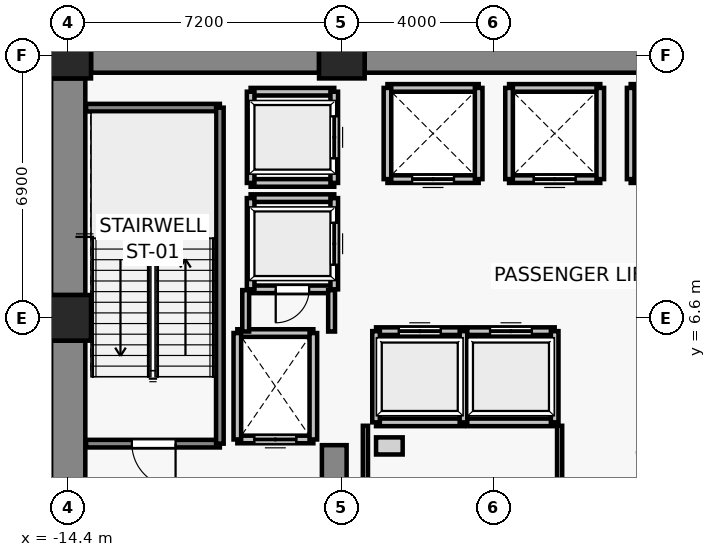
"""IFC4 building model, lengths in metres.
Left out: names, types, materials, properties, quantities, classifications, styles, units other than length and angle.
Written with IfcOpenShell. Run it as: python <this file> out.ifc"""

import sys

from ifc_helpers import new_model, si_unit, direction, frame, frame_2d, origin, origin_2d, place, context, subcontext, project, spatial, rectangle, extrude, source, transform, mapped, element, fill, save


model = new_model("IFC4")
c1 = context("Model", 3, precision=1e-05, world=origin(), true_north=direction((0.0, 1.0)))
c2 = subcontext(c1, "Body", "Model", "MODEL_VIEW")
j1 = project(units=[si_unit("LENGTHUNIT", "METRE"), si_unit("PLANEANGLEUNIT", "RADIAN")], contexts=[c1])
p1 = place(None, origin())
s1 = spatial("IfcSite", under=j1, at=p1, CompositionType="ELEMENT")
p2 = place(p1, origin())
s2 = spatial("IfcBuilding", under=s1, at=p2, CompositionType="ELEMENT")
p3 = place(p2, origin())
s3 = spatial("IfcBuildingStorey", under=s2, at=p3, CompositionType="ELEMENT", Elevation=0.0)
for number, where, z_axis, x_axis in (
    (1, (-14.4, 6.6, 0.0), (0.0, 0.0, 1.0), (1.0, 0.0, 0.0)),
    (2, (-14.4, 13.5, 0.0), (0.0, 0.0, 1.0), (1.0, 0.0, 0.0)),
    (3, (-7.2, 13.5, 0.0), (0.0, 0.0, 1.0), (1.0, 0.0, 0.0)),
):
    element("IfcColumn", number, at=place(p3, frame(where, z_axis=z_axis, x_axis=x_axis)), inside=s3, PredefinedType="COLUMN", context=c2, shape_type="SweptSolid", body=[
        extrude(rectangle(XDim=1.2, YDim=1.2, at=origin_2d()), origin(), (0.0, 0.0, 1.0), 5.0),
    ])
p4 = place(p3, frame((-13.8, 13.5, 0.0), z_axis=(0.0, 0.0, 1.0), x_axis=(1.0, 0.0, 0.0)))
e4 = element("IfcWall", 4, at=p4, inside=s3, PredefinedType="SHEAR", context=c2, shape_type="SweptSolid", body=[
    extrude(rectangle(XDim=6.0, YDim=0.9, at=frame_2d((3.0, 0.0))), origin(), (0.0, 0.0, 1.0), 4.7),
])
p5 = place(p3, frame((-6.6, 13.5, 0.0), z_axis=(0.0, 0.0, 1.0), x_axis=(1.0, 0.0, 0.0)))
e5 = element("IfcWall", 5, at=p5, inside=s3, PredefinedType="SHEAR", context=c2, shape_type="SweptSolid", body=[
    extrude(rectangle(XDim=13.2, YDim=0.9, at=frame_2d((6.6, 0.0))), origin(), (0.0, 0.0, 1.0), 4.7),
])
p6 = place(p3, frame((-14.4, -0.6, 0.0), z_axis=(0.0, 0.0, 1.0), x_axis=(0.0, 1.0, 0.0)))
e6 = element("IfcWall", 6, at=p6, inside=s3, PredefinedType="SHEAR", context=c2, shape_type="SweptSolid", body=[
    extrude(rectangle(XDim=6.6, YDim=0.9, at=frame_2d((3.3, 0.0))), origin(), (0.0, 0.0, 1.0), 4.7),
])
p7 = place(p3, frame((-14.4, 7.2, 0.0), z_axis=(0.0, 0.0, 1.0), x_axis=(0.0, 1.0, 0.0)))
e7 = element("IfcWall", 7, at=p7, inside=s3, PredefinedType="SHEAR", context=c2, shape_type="SweptSolid", body=[
    extrude(rectangle(XDim=5.7, YDim=0.9, at=frame_2d((2.85, 0.0))), origin(), (0.0, 0.0, 1.0), 4.7),
])
p8 = place(p3, frame((-7.4, -0.75, 0.0), z_axis=(0.0, 0.0, 1.0), x_axis=(0.0, 1.0, 0.0)))
e8 = element("IfcWall", 8, at=p8, inside=s3, PredefinedType="SHEAR", context=c2, shape_type="SweptSolid", body=[
    extrude(rectangle(XDim=4.0, YDim=0.65, at=frame_2d((2.0, 0.0))), origin(), (0.0, 0.0, 1.0), 4.7),
])
p9 = place(p3, frame((-7.95, 3.4, 0.0), z_axis=(0.0, 0.0, 1.0), x_axis=(-1.0, 0.0, 0.0)))
e9 = element("IfcWall", 9, at=p9, inside=s3, PredefinedType="SOLIDWALL", context=c2, shape_type="SweptSolid", body=[
    extrude(rectangle(XDim=2.0, YDim=0.2, at=frame_2d((1.0, 0.0))), origin(), (0.0, 0.0, 1.0), 4.7),
])
p10 = place(p9, frame((0.45, 0.0, 0.0)))
e10 = element("IfcOpeningElement", 10, at=p10, cuts=e9, PredefinedType="OPENING", context=c2, shape_type="SweptSolid", body=[
    extrude(rectangle(XDim=1.1, YDim=2.2, at=frame_2d((0.55, 1.1))), frame((0.0, 0.11, 0.0), z_axis=(0.0, -1.0, 0.0), x_axis=(1.0, 0.0, 0.0)), (0.0, 0.0, 1.0), 0.22),
])
p11 = place(p3, frame((-9.95, 6.2, 0.0), z_axis=(0.0, 0.0, 1.0), x_axis=(1.0, 0.0, 0.0)))
e11 = element("IfcWall", 11, at=p11, inside=s3, PredefinedType="SOLIDWALL", context=c2, shape_type="SweptSolid", body=[
    extrude(rectangle(XDim=2.0, YDim=0.2, at=frame_2d((1.0, 0.0))), origin(), (0.0, 0.0, 1.0), 4.7),
])
for number, where, z_axis, x_axis in (
    (12, (-9.95, 3.4, 0.0), (0.0, 0.0, 1.0), (0.0, 1.0, 0.0)),
    (13, (-7.95, 6.2, 0.0), (0.0, 0.0, 1.0), (0.0, -1.0, 0.0)),
):
    element("IfcWall", number, at=place(p3, frame(where, z_axis=z_axis, x_axis=x_axis)), inside=s3, PredefinedType="SOLIDWALL", context=c2, shape_type="SweptSolid", body=[
        extrude(rectangle(XDim=2.8, YDim=0.2, at=frame_2d((1.4, 0.0))), origin(), (0.0, 0.0, 1.0), 4.7),
    ])
p12 = place(p3, frame((-3.6, 10.25, 0.0), z_axis=(0.0, 0.0, 1.0), x_axis=(-1.0, 0.0, 0.0)))
e14 = element("IfcWall", 14, at=p12, inside=s3, PredefinedType="SOLIDWALL", context=c2, shape_type="SweptSolid", body=[
    extrude(rectangle(XDim=2.4, YDim=0.2, at=frame_2d((1.2, 0.0))), origin(), (0.0, 0.0, 1.0), 4.7),
])
p13 = place(p12, frame((0.65, 0.0, 0.0)))
e15 = element("IfcOpeningElement", 15, at=p13, cuts=e14, PredefinedType="OPENING", context=c2, shape_type="SweptSolid", body=[
    extrude(rectangle(XDim=1.1, YDim=2.2, at=frame_2d((0.55, 1.1))), frame((0.0, 0.11, 0.0), z_axis=(0.0, -1.0, 0.0), x_axis=(1.0, 0.0, 0.0)), (0.0, 0.0, 1.0), 0.22),
])
for number, where, z_axis, x_axis in (
    (16, (-6.0, 12.65, 0.0), (0.0, 0.0, 1.0), (1.0, 0.0, 0.0)),
    (17, (-6.0, 10.25, 0.0), (0.0, 0.0, 1.0), (0.0, 1.0, 0.0)),
    (18, (-3.6, 12.65, 0.0), (0.0, 0.0, 1.0), (0.0, -1.0, 0.0)),
):
    element("IfcWall", number, at=place(p3, frame(where, z_axis=z_axis, x_axis=x_axis)), inside=s3, PredefinedType="SOLIDWALL", context=c2, shape_type="SweptSolid", body=[
        extrude(rectangle(XDim=2.4, YDim=0.2, at=frame_2d((1.2, 0.0))), origin(), (0.0, 0.0, 1.0), 4.7),
    ])
p14 = place(p3, frame((-0.4, 10.25, 0.0), z_axis=(0.0, 0.0, 1.0), x_axis=(-1.0, 0.0, 0.0)))
e19 = element("IfcWall", 19, at=p14, inside=s3, PredefinedType="SOLIDWALL", context=c2, shape_type="SweptSolid", body=[
    extrude(rectangle(XDim=2.4, YDim=0.2, at=frame_2d((1.2, 0.0))), origin(), (0.0, 0.0, 1.0), 4.7),
])
p15 = place(p14, frame((0.65, 0.0, 0.0)))
e20 = element("IfcOpeningElement", 20, at=p15, cuts=e19, PredefinedType="OPENING", context=c2, shape_type="SweptSolid", body=[
    extrude(rectangle(XDim=1.1, YDim=2.2, at=frame_2d((0.55, 1.1))), frame((0.0, 0.11, 0.0), z_axis=(0.0, -1.0, 0.0), x_axis=(1.0, 0.0, 0.0)), (0.0, 0.0, 1.0), 0.22),
])
p16 = place(p3, frame((-2.8, 12.65, 0.0), z_axis=(0.0, 0.0, 1.0), x_axis=(1.0, 0.0, 0.0)))
e21 = element("IfcWall", 21, at=p16, inside=s3, PredefinedType="SOLIDWALL", context=c2, shape_type="SweptSolid", body=[
    extrude(rectangle(XDim=2.4, YDim=0.2, at=frame_2d((1.2, 0.0))), origin(), (0.0, 0.0, 1.0), 4.7),
])
for number, where, z_axis, x_axis in (
    (22, (-2.8, 10.25, 0.0), (0.0, 0.0, 1.0), (0.0, 1.0, 0.0)),
    (23, (-0.4, 12.65, 0.0), (0.0, 0.0, 1.0), (0.0, -1.0, 0.0)),
):
    element("IfcWall", number, at=place(p3, frame(where, z_axis=z_axis, x_axis=x_axis)), inside=s3, PredefinedType="SOLIDWALL", context=c2, shape_type="SweptSolid", body=[
        extrude(rectangle(XDim=2.4, YDim=0.2, at=frame_2d((1.2, 0.0))), origin(), (0.0, 0.0, 1.0), 4.7),
    ])
p17 = place(p3, frame((2.8, 10.25, 0.0), z_axis=(0.0, 0.0, 1.0), x_axis=(-1.0, 0.0, 0.0)))
e24 = element("IfcWall", 24, at=p17, inside=s3, PredefinedType="SOLIDWALL", context=c2, shape_type="SweptSolid", body=[
    extrude(rectangle(XDim=2.4, YDim=0.2, at=frame_2d((1.2, 0.0))), origin(), (0.0, 0.0, 1.0), 4.7),
])
p18 = place(p17, frame((0.65, 0.0, 0.0)))
e25 = element("IfcOpeningElement", 25, at=p18, cuts=e24, PredefinedType="OPENING", context=c2, shape_type="SweptSolid", body=[
    extrude(rectangle(XDim=1.1, YDim=2.2, at=frame_2d((0.55, 1.1))), frame((0.0, 0.11, 0.0), z_axis=(0.0, -1.0, 0.0), x_axis=(1.0, 0.0, 0.0)), (0.0, 0.0, 1.0), 0.22),
])
p19 = place(p3, frame((0.4, 12.65, 0.0), z_axis=(0.0, 0.0, 1.0), x_axis=(1.0, 0.0, 0.0)))
e26 = element("IfcWall", 26, at=p19, inside=s3, PredefinedType="SOLIDWALL", context=c2, shape_type="SweptSolid", body=[
    extrude(rectangle(XDim=2.4, YDim=0.2, at=frame_2d((1.2, 0.0))), origin(), (0.0, 0.0, 1.0), 4.7),
])
p20 = place(p3, frame((0.4, 10.25, 0.0), z_axis=(0.0, 0.0, 1.0), x_axis=(0.0, 1.0, 0.0)))
e27 = element("IfcWall", 27, at=p20, inside=s3, PredefinedType="SOLIDWALL", context=c2, shape_type="SweptSolid", body=[
    extrude(rectangle(XDim=2.4, YDim=0.2, at=frame_2d((1.2, 0.0))), origin(), (0.0, 0.0, 1.0), 4.7),
])
p21 = place(p3, frame((-4.0, 3.85, 0.0), z_axis=(0.0, 0.0, 1.0), x_axis=(-1.0, 0.0, 0.0)))
e28 = element("IfcWall", 28, at=p21, inside=s3, PredefinedType="SOLIDWALL", context=c2, shape_type="SweptSolid", body=[
    extrude(rectangle(XDim=2.3, YDim=0.2, at=frame_2d((1.15, 0.0))), origin(), (0.0, 0.0, 1.0), 4.7),
])
p22 = place(p3, frame((-6.3, 6.25, 0.0), z_axis=(0.0, 0.0, 1.0), x_axis=(1.0, 0.0, 0.0)))
e29 = element("IfcWall", 29, at=p22, inside=s3, PredefinedType="SOLIDWALL", context=c2, shape_type="SweptSolid", body=[
    extrude(rectangle(XDim=2.3, YDim=0.2, at=frame_2d((1.15, 0.0))), origin(), (0.0, 0.0, 1.0), 4.7),
])
p23 = place(p22, frame((0.6, 0.0, 0.0)))
e30 = element("IfcOpeningElement", 30, at=p23, cuts=e29, PredefinedType="OPENING", context=c2, shape_type="SweptSolid", body=[
    extrude(rectangle(XDim=1.1, YDim=2.2, at=frame_2d((0.55, 1.1))), frame((0.0, 0.11, 0.0), z_axis=(0.0, -1.0, 0.0), x_axis=(1.0, 0.0, 0.0)), (0.0, 0.0, 1.0), 0.22),
])
for number, where, z_axis, x_axis in (
    (31, (-6.3, 3.85, 0.0), (0.0, 0.0, 1.0), (0.0, 1.0, 0.0)),
    (32, (-4.0, 6.25, 0.0), (0.0, 0.0, 1.0), (0.0, -1.0, 0.0)),
):
    element("IfcWall", number, at=place(p3, frame(where, z_axis=z_axis, x_axis=x_axis)), inside=s3, PredefinedType="SOLIDWALL", context=c2, shape_type="SweptSolid", body=[
        extrude(rectangle(XDim=2.4, YDim=0.2, at=frame_2d((1.2, 0.0))), origin(), (0.0, 0.0, 1.0), 4.7),
    ])
p24 = place(p3, frame((-1.6, 3.85, 0.0), z_axis=(0.0, 0.0, 1.0), x_axis=(-1.0, 0.0, 0.0)))
e33 = element("IfcWall", 33, at=p24, inside=s3, PredefinedType="SOLIDWALL", context=c2, shape_type="SweptSolid", body=[
    extrude(rectangle(XDim=2.3, YDim=0.2, at=frame_2d((1.15, 0.0))), origin(), (0.0, 0.0, 1.0), 4.7),
])
p25 = place(p3, frame((-3.9, 6.25, 0.0), z_axis=(0.0, 0.0, 1.0), x_axis=(1.0, 0.0, 0.0)))
e34 = element("IfcWall", 34, at=p25, inside=s3, PredefinedType="SOLIDWALL", context=c2, shape_type="SweptSolid", body=[
    extrude(rectangle(XDim=2.3, YDim=0.2, at=frame_2d((1.15, 0.0))), origin(), (0.0, 0.0, 1.0), 4.7),
])
p26 = place(p25, frame((0.6, 0.0, 0.0)))
e35 = element("IfcOpeningElement", 35, at=p26, cuts=e34, PredefinedType="OPENING", context=c2, shape_type="SweptSolid", body=[
    extrude(rectangle(XDim=1.1, YDim=2.2, at=frame_2d((0.55, 1.1))), frame((0.0, 0.11, 0.0), z_axis=(0.0, -1.0, 0.0), x_axis=(1.0, 0.0, 0.0)), (0.0, 0.0, 1.0), 0.22),
])
p27 = place(p3, frame((-1.6, 6.25, 0.0), z_axis=(0.0, 0.0, 1.0), x_axis=(0.0, -1.0, 0.0)))
e36 = element("IfcWall", 36, at=p27, inside=s3, PredefinedType="SOLIDWALL", context=c2, shape_type="SweptSolid", body=[
    extrude(rectangle(XDim=2.4, YDim=0.2, at=frame_2d((1.2, 0.0))), origin(), (0.0, 0.0, 1.0), 4.7),
])
p28 = place(p3, frame((-7.4, 7.35, 0.0), z_axis=(0.0, 0.0, 1.0), x_axis=(-1.0, 0.0, 0.0)))
e37 = element("IfcWall", 37, at=p28, inside=s3, PredefinedType="SOLIDWALL", context=c2, shape_type="SweptSolid", body=[
    extrude(rectangle(XDim=2.2, YDim=0.2, at=frame_2d((1.1, 0.0))), origin(), (0.0, 0.0, 1.0), 3.79),
])
p29 = place(p28, frame((0.66, 0.0, 0.0)))
e38 = element("IfcOpeningElement", 38, at=p29, cuts=e37, PredefinedType="OPENING", context=c2, shape_type="SweptSolid", body=[
    extrude(rectangle(XDim=0.88, YDim=2.1, at=frame_2d((0.44, 1.05))), frame((0.0, 0.11, 0.0), z_axis=(0.0, -1.0, 0.0), x_axis=(1.0, 0.0, 0.0)), (0.0, 0.0, 1.0), 0.22),
])
p30 = place(p3, frame((-9.6, 9.75, 0.0), z_axis=(0.0, 0.0, 1.0), x_axis=(1.0, 0.0, 0.0)))
e39 = element("IfcWall", 39, at=p30, inside=s3, PredefinedType="SOLIDWALL", context=c2, shape_type="SweptSolid", body=[
    extrude(rectangle(XDim=2.2, YDim=0.2, at=frame_2d((1.1, 0.0))), origin(), (0.0, 0.0, 1.0), 3.79),
])
p31 = place(p3, frame((-9.6, 7.35, 0.0), z_axis=(0.0, 0.0, 1.0), x_axis=(0.0, 1.0, 0.0)))
e40 = element("IfcWall", 40, at=p31, inside=s3, PredefinedType="SOLIDWALL", context=c2, shape_type="SweptSolid", body=[
    extrude(rectangle(XDim=2.4, YDim=0.2, at=frame_2d((1.2, 0.0))), origin(), (0.0, 0.0, 1.0), 4.7),
])
p32 = place(p3, frame((-7.4, 9.75, 0.0), z_axis=(0.0, 0.0, 1.0), x_axis=(0.0, -1.0, 0.0)))
e41 = element("IfcWall", 41, at=p32, inside=s3, PredefinedType="SOLIDWALL", context=c2, shape_type="SweptSolid", body=[
    extrude(rectangle(XDim=2.4, YDim=0.2, at=frame_2d((1.2, 0.0))), origin(), (0.0, 0.0, 1.0), 3.79),
])
p33 = place(p32, frame((0.65, 0.0, 0.0)))
e42 = element("IfcOpeningElement", 42, at=p33, cuts=e41, PredefinedType="OPENING", context=c2, shape_type="SweptSolid", body=[
    extrude(rectangle(XDim=1.1, YDim=2.2, at=frame_2d((0.55, 1.1))), frame((0.0, 0.11, 0.0), z_axis=(0.0, -1.0, 0.0), x_axis=(1.0, 0.0, 0.0)), (0.0, 0.0, 1.0), 0.22),
])
for number, where, z_axis, x_axis in (
    (43, (-7.4, 10.15, 0.0), (0.0, 0.0, 1.0), (-1.0, 0.0, 0.0)),
    (44, (-9.6, 12.55, 0.0), (0.0, 0.0, 1.0), (1.0, 0.0, 0.0)),
):
    element("IfcWall", number, at=place(p3, frame(where, z_axis=z_axis, x_axis=x_axis)), inside=s3, PredefinedType="SOLIDWALL", context=c2, shape_type="SweptSolid", body=[
        extrude(rectangle(XDim=2.2, YDim=0.2, at=frame_2d((1.1, 0.0))), origin(), (0.0, 0.0, 1.0), 3.79),
    ])
p34 = place(p3, frame((-9.6, 10.15, 0.0), z_axis=(0.0, 0.0, 1.0), x_axis=(0.0, 1.0, 0.0)))
e45 = element("IfcWall", 45, at=p34, inside=s3, PredefinedType="SOLIDWALL", context=c2, shape_type="SweptSolid", body=[
    extrude(rectangle(XDim=2.4, YDim=0.2, at=frame_2d((1.2, 0.0))), origin(), (0.0, 0.0, 1.0), 4.7),
])
p35 = place(p3, frame((-7.4, 12.55, 0.0), z_axis=(0.0, 0.0, 1.0), x_axis=(0.0, -1.0, 0.0)))
e46 = element("IfcWall", 46, at=p35, inside=s3, PredefinedType="SOLIDWALL", context=c2, shape_type="SweptSolid", body=[
    extrude(rectangle(XDim=2.4, YDim=0.2, at=frame_2d((1.2, 0.0))), origin(), (0.0, 0.0, 1.0), 3.79),
])
p36 = place(p35, frame((0.65, 0.0, 0.0)))
e47 = element("IfcOpeningElement", 47, at=p36, cuts=e46, PredefinedType="OPENING", context=c2, shape_type="SweptSolid", body=[
    extrude(rectangle(XDim=1.1, YDim=2.2, at=frame_2d((0.55, 1.1))), frame((0.0, 0.11, 0.0), z_axis=(0.0, -1.0, 0.0), x_axis=(1.0, 0.0, 0.0)), (0.0, 0.0, 1.0), 0.22),
])
p37 = place(p3, frame((-10.41, 3.29, 0.0), z_axis=(0.0, 0.0, 1.0), x_axis=(-1.0, 0.0, 0.0)))
e48 = element("IfcWall", 48, at=p37, inside=s3, PredefinedType="SOLIDWALL", context=c2, shape_type="SweptSolid", body=[
    extrude(rectangle(XDim=3.52, YDim=0.2, at=frame_2d((1.76, 0.0))), origin(), (0.0, 0.0, 1.0), 4.7),
])
p38 = place(p37, frame((1.165, 0.0, 0.0)))
e49 = element("IfcOpeningElement", 49, at=p38, cuts=e48, PredefinedType="OPENING", context=c2, shape_type="SweptSolid", body=[
    extrude(rectangle(XDim=1.15, YDim=2.15, at=frame_2d((0.575, 1.075))), frame((0.0, 0.11, 0.0), z_axis=(0.0, -1.0, 0.0), x_axis=(1.0, 0.0, 0.0)), (0.0, 0.0, 1.0), 0.22),
])
p39 = place(p3, frame((-13.93, 12.13, 0.0), z_axis=(0.0, 0.0, 1.0), x_axis=(1.0, 0.0, 0.0)))
e50 = element("IfcWall", 50, at=p39, inside=s3, PredefinedType="SOLIDWALL", context=c2, shape_type="SweptSolid", body=[
    extrude(rectangle(XDim=3.52, YDim=0.2, at=frame_2d((1.76, 0.0))), origin(), (0.0, 0.0, 1.0), 4.7),
])
p40 = place(p3, frame((-10.41, 12.13, 0.0), z_axis=(0.0, 0.0, 1.0), x_axis=(0.0, -1.0, 0.0)))
e51 = element("IfcWall", 51, at=p40, inside=s3, PredefinedType="SOLIDWALL", context=c2, shape_type="SweptSolid", body=[
    extrude(rectangle(XDim=8.84, YDim=0.2, at=frame_2d((4.42, 0.0))), origin(), (0.0, 0.0, 1.0), 4.7),
])
p41 = place(p3, frame((-9.73, 6.24, 0.0), z_axis=(0.0, 0.0, 1.0), x_axis=(0.0, 1.0, 0.0)))
e52 = element("IfcWall", 52, at=p41, inside=s3, PredefinedType="PARTITIONING", context=c2, shape_type="SweptSolid", body=[
    extrude(rectangle(XDim=1.09, YDim=0.18, at=frame_2d((0.545, 0.0))), origin(), (0.0, 0.0, 1.0), 4.7),
])
p42 = place(p3, frame((-7.47, 7.33, 0.0), z_axis=(0.0, 0.0, 1.0), x_axis=(0.0, -1.0, 0.0)))
e53 = element("IfcWall", 53, at=p42, inside=s3, PredefinedType="PARTITIONING", context=c2, shape_type="SweptSolid", body=[
    extrude(rectangle(XDim=1.09, YDim=0.18, at=frame_2d((0.545, 0.0))), origin(), (0.0, 0.0, 1.0), 3.79),
])
p43 = place(p3, frame((-6.58, -0.73, 0.0), z_axis=(0.0, 0.0, 1.0), x_axis=(0.0, 1.0, 0.0)))
e54 = element("IfcWall", 54, at=p43, inside=s3, PredefinedType="PARTITIONING", context=c2, shape_type="SweptSolid", body=[
    extrude(rectangle(XDim=4.49, YDim=0.135, at=frame_2d((2.245, 0.0))), origin(), (0.0, 0.0, 1.0), 4.073),
])
p44 = place(p3, frame((-1.47, 3.76, 0.0), z_axis=(0.0, 0.0, 1.0), x_axis=(0.0, -1.0, 0.0)))
e55 = element("IfcWall", 55, at=p44, inside=s3, PredefinedType="PARTITIONING", context=c2, shape_type="SweptSolid", body=[
    extrude(rectangle(XDim=4.49, YDim=0.135, at=frame_2d((2.245, 0.0))), origin(), (0.0, 0.0, 1.0), 4.073),
])
p45 = place(p44, frame((1.8, 0.0, 0.0)))
e56 = element("IfcOpeningElement", 56, at=p45, cuts=e55, PredefinedType="OPENING", context=c2, shape_type="SweptSolid", body=[
    extrude(rectangle(XDim=0.92, YDim=2.1, at=frame_2d((0.46, 1.05))), frame((0.0, 0.077, 0.0), z_axis=(0.0, -1.0, 0.0), x_axis=(1.0, 0.0, 0.0)), (0.0, 0.0, 1.0), 0.155),
])
m1 = source(origin(), c2, "Body", "SweptSolid", [
    extrude(rectangle(XDim=1.1, YDim=2.2, at=frame_2d((0.55, 1.1))), frame((0.0, 0.025, 0.0), z_axis=(0.0, -1.0, 0.0), x_axis=(1.0, 0.0, 0.0)), (0.0, 0.0, 1.0), 0.05),
])
p46 = place(p10, origin())
e57 = element("IfcDoor", 57, at=p46, inside=s3, OperationType="DOUBLE_DOOR_SLIDING", PredefinedType="DOOR", context=c2, shape_type="MappedRepresentation", body=[
    mapped(m1, transform((0.0, 0.0, 0.0), x_axis=(1.0, 0.0, 0.0), y_axis=(0.0, 1.0, 0.0), z_axis=(0.0, 0.0, 1.0), scale=1.0)),
])
fill(e10, e57)
p47 = place(p13, origin())
e58 = element("IfcDoor", 58, at=p47, inside=s3, OperationType="DOUBLE_DOOR_SLIDING", PredefinedType="DOOR", context=c2, shape_type="MappedRepresentation", body=[
    mapped(m1, transform((0.0, 0.0, 0.0), x_axis=(1.0, 0.0, 0.0), y_axis=(0.0, 1.0, 0.0), z_axis=(0.0, 0.0, 1.0), scale=1.0)),
])
fill(e15, e58)
p48 = place(p15, origin())
e59 = element("IfcDoor", 59, at=p48, inside=s3, OperationType="DOUBLE_DOOR_SLIDING", PredefinedType="DOOR", context=c2, shape_type="MappedRepresentation", body=[
    mapped(m1, transform((0.0, 0.0, 0.0), x_axis=(1.0, 0.0, 0.0), y_axis=(0.0, 1.0, 0.0), z_axis=(0.0, 0.0, 1.0), scale=1.0)),
])
fill(e20, e59)
p49 = place(p23, origin())
e60 = element("IfcDoor", 60, at=p49, inside=s3, OperationType="DOUBLE_DOOR_SLIDING", PredefinedType="DOOR", context=c2, shape_type="MappedRepresentation", body=[
    mapped(m1, transform((0.0, 0.0, 0.0), x_axis=(1.0, 0.0, 0.0), y_axis=(0.0, 1.0, 0.0), z_axis=(0.0, 0.0, 1.0), scale=1.0)),
])
fill(e30, e60)
p50 = place(p26, origin())
e61 = element("IfcDoor", 61, at=p50, inside=s3, OperationType="DOUBLE_DOOR_SLIDING", PredefinedType="DOOR", context=c2, shape_type="MappedRepresentation", body=[
    mapped(m1, transform((0.0, 0.0, 0.0), x_axis=(1.0, 0.0, 0.0), y_axis=(0.0, 1.0, 0.0), z_axis=(0.0, 0.0, 1.0), scale=1.0)),
])
fill(e35, e61)
p51 = place(p33, origin())
e62 = element("IfcDoor", 62, at=p51, inside=s3, OperationType="DOUBLE_DOOR_SLIDING", PredefinedType="DOOR", context=c2, shape_type="MappedRepresentation", body=[
    mapped(m1, transform((0.0, 0.0, 0.0), x_axis=(1.0, 0.0, 0.0), y_axis=(0.0, 1.0, 0.0), z_axis=(0.0, 0.0, 1.0), scale=1.0)),
])
fill(e42, e62)
p52 = place(p36, origin())
e63 = element("IfcDoor", 63, at=p52, inside=s3, OperationType="DOUBLE_DOOR_SLIDING", PredefinedType="DOOR", context=c2, shape_type="MappedRepresentation", body=[
    mapped(m1, transform((0.0, 0.0, 0.0), x_axis=(1.0, 0.0, 0.0), y_axis=(0.0, 1.0, 0.0), z_axis=(0.0, 0.0, 1.0), scale=1.0)),
])
fill(e47, e63)
m2 = source(origin(), c2, "Body", "SweptSolid", [
    extrude(rectangle(XDim=1.15, YDim=2.15, at=frame_2d((0.575, 1.075))), frame((0.0, 0.025, 0.0), z_axis=(0.0, -1.0, 0.0), x_axis=(1.0, 0.0, 0.0)), (0.0, 0.0, 1.0), 0.05),
])
p53 = place(p38, origin())
e64 = element("IfcDoor", 64, at=p53, inside=s3, OperationType="SINGLE_SWING_LEFT", PredefinedType="DOOR", context=c2, shape_type="MappedRepresentation", body=[
    mapped(m2, transform((0.0, 0.0, 0.0), x_axis=(1.0, 0.0, 0.0), y_axis=(0.0, 1.0, 0.0), z_axis=(0.0, 0.0, 1.0), scale=1.0)),
])
fill(e49, e64)
m3 = source(origin(), c2, "Body", "SweptSolid", [
    extrude(rectangle(XDim=0.88, YDim=2.1, at=frame_2d((0.44, 1.05))), frame((0.0, 0.025, 0.0), z_axis=(0.0, -1.0, 0.0), x_axis=(1.0, 0.0, 0.0)), (0.0, 0.0, 1.0), 0.05),
])
p54 = place(p29, origin())
e65 = element("IfcDoor", 65, at=p54, inside=s3, OperationType="SINGLE_SWING_RIGHT", PredefinedType="DOOR", context=c2, shape_type="MappedRepresentation", body=[
    mapped(m3, transform((0.0, 0.0, 0.0), x_axis=(1.0, 0.0, 0.0), y_axis=(0.0, 1.0, 0.0), z_axis=(0.0, 0.0, 1.0), scale=1.0)),
])
fill(e38, e65)
save(model, sys.argv[1])
